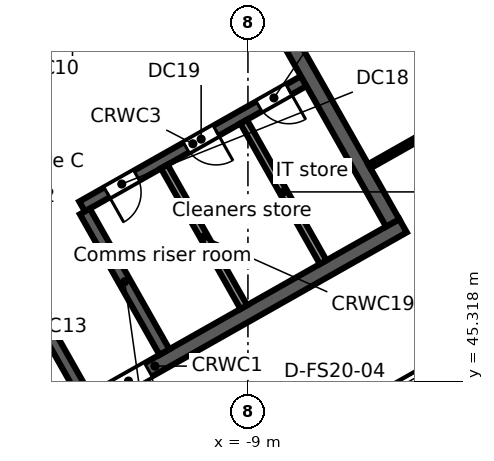
"""IFC4 building model, lengths in metres.
Left out: names, types, materials, properties, quantities, classifications, styles, units other than length and angle.
Written with IfcOpenShell. Run it as: python <this file> out.ifc"""

import sys

from ifc_helpers import new_model, si_unit, direction, frame, frame_2d, origin, place, context, subcontext, project, spatial, rectangle, extrude, element, fill, save


model = new_model("IFC4")
c1 = context("Model", 3, precision=1e-05, world=origin(), true_north=direction((0.0, 1.0)))
c2 = subcontext(c1, "Body", "Model", "MODEL_VIEW")
j1 = project(units=[si_unit("LENGTHUNIT", "METRE"), si_unit("PLANEANGLEUNIT", "RADIAN")], contexts=[c1])
p1 = place(None, origin())
s1 = spatial("IfcSite", under=j1, at=p1, CompositionType="ELEMENT")
p2 = place(p1, origin())
s2 = spatial("IfcBuilding", under=s1, at=p2, CompositionType="ELEMENT")
p3 = place(p2, frame((0.0, 0.0, 293.1)))
s3 = spatial("IfcBuildingStorey", under=s2, at=p3, CompositionType="ELEMENT", Elevation=293.1)
p4 = place(p3, frame((-58.732, 38.771, 0.0), z_axis=(0.0, 0.0, 1.0), x_axis=(0.870355615581, 0.492423702137, 0.0)))
e1 = element("IfcWall", 1, at=p4, inside=s3, PredefinedType="STANDARD", context=c2, shape_type="SweptSolid", body=[
    extrude(rectangle(XDim=64.052, YDim=0.25, at=frame_2d((32.026, 0.0))), origin(), (0.0, 0.0, 1.0), 3.52),
])
p5 = place(p4, frame((61.259, 0.0, 0.8)))
e2 = element("IfcOpeningElement", 2, at=p5, cuts=e1, PredefinedType="OPENING", context=c2, shape_type="SweptSolid", body=[
    extrude(rectangle(XDim=2.4, YDim=2.2, at=frame_2d((1.2, 1.1))), frame((0.0, 0.135, 0.0), z_axis=(0.0, -1.0, 0.0), x_axis=(1.0, 0.0, 0.0)), (0.0, 0.0, 1.0), 0.27),
])
p6 = place(p4, frame((58.216, 0.0, 0.8)))
e3 = element("IfcOpeningElement", 3, at=p6, cuts=e1, PredefinedType="OPENING", context=c2, shape_type="SweptSolid", body=[
    extrude(rectangle(XDim=2.4, YDim=2.2, at=frame_2d((1.2, 1.1))), frame((0.0, 0.135, 0.0), z_axis=(0.0, -1.0, 0.0), x_axis=(1.0, 0.0, 0.0)), (0.0, 0.0, 1.0), 0.27),
])
p7 = place(p4, frame((55.173, 0.0, 0.8)))
e4 = element("IfcOpeningElement", 4, at=p7, cuts=e1, PredefinedType="OPENING", context=c2, shape_type="SweptSolid", body=[
    extrude(rectangle(XDim=2.4, YDim=2.2, at=frame_2d((1.2, 1.1))), frame((0.0, 0.135, 0.0), z_axis=(0.0, -1.0, 0.0), x_axis=(1.0, 0.0, 0.0)), (0.0, 0.0, 1.0), 0.27),
])
p8 = place(p4, frame((52.129, 0.0, 0.8)))
e5 = element("IfcOpeningElement", 5, at=p8, cuts=e1, PredefinedType="OPENING", context=c2, shape_type="SweptSolid", body=[
    extrude(rectangle(XDim=2.4, YDim=2.2, at=frame_2d((1.2, 1.1))), frame((0.0, 0.135, 0.0), z_axis=(0.0, -1.0, 0.0), x_axis=(1.0, 0.0, 0.0)), (0.0, 0.0, 1.0), 0.27),
])
p9 = place(p4, frame((49.086, 0.0, 0.8)))
e6 = element("IfcOpeningElement", 6, at=p9, cuts=e1, PredefinedType="OPENING", context=c2, shape_type="SweptSolid", body=[
    extrude(rectangle(XDim=2.4, YDim=2.2, at=frame_2d((1.2, 1.1))), frame((0.0, 0.135, 0.0), z_axis=(0.0, -1.0, 0.0), x_axis=(1.0, 0.0, 0.0)), (0.0, 0.0, 1.0), 0.27),
])
p10 = place(p4, frame((46.043, 0.0, 0.8)))
e7 = element("IfcOpeningElement", 7, at=p10, cuts=e1, PredefinedType="OPENING", context=c2, shape_type="SweptSolid", body=[
    extrude(rectangle(XDim=2.4, YDim=2.2, at=frame_2d((1.2, 1.1))), frame((0.0, 0.135, 0.0), z_axis=(0.0, -1.0, 0.0), x_axis=(1.0, 0.0, 0.0)), (0.0, 0.0, 1.0), 0.27),
])
p11 = place(p4, frame((43.0, 0.0, 0.8)))
e8 = element("IfcOpeningElement", 8, at=p11, cuts=e1, PredefinedType="OPENING", context=c2, shape_type="SweptSolid", body=[
    extrude(rectangle(XDim=2.4, YDim=2.2, at=frame_2d((1.2, 1.1))), frame((0.0, 0.135, 0.0), z_axis=(0.0, -1.0, 0.0), x_axis=(1.0, 0.0, 0.0)), (0.0, 0.0, 1.0), 0.27),
])
p12 = place(p4, frame((39.956, 0.0, 0.8)))
e9 = element("IfcOpeningElement", 9, at=p12, cuts=e1, PredefinedType="OPENING", context=c2, shape_type="SweptSolid", body=[
    extrude(rectangle(XDim=2.4, YDim=2.2, at=frame_2d((1.2, 1.1))), frame((0.0, 0.135, 0.0), z_axis=(0.0, -1.0, 0.0), x_axis=(1.0, 0.0, 0.0)), (0.0, 0.0, 1.0), 0.27),
])
p13 = place(p4, frame((36.913, 0.0, 0.8)))
e10 = element("IfcOpeningElement", 10, at=p13, cuts=e1, PredefinedType="OPENING", context=c2, shape_type="SweptSolid", body=[
    extrude(rectangle(XDim=2.4, YDim=2.2, at=frame_2d((1.2, 1.1))), frame((0.0, 0.135, 0.0), z_axis=(0.0, -1.0, 0.0), x_axis=(1.0, 0.0, 0.0)), (0.0, 0.0, 1.0), 0.27),
])
p14 = place(p4, frame((33.87, 0.0, 0.8)))
e11 = element("IfcOpeningElement", 11, at=p14, cuts=e1, PredefinedType="OPENING", context=c2, shape_type="SweptSolid", body=[
    extrude(rectangle(XDim=2.4, YDim=2.2, at=frame_2d((1.2, 1.1))), frame((0.0, 0.135, 0.0), z_axis=(0.0, -1.0, 0.0), x_axis=(1.0, 0.0, 0.0)), (0.0, 0.0, 1.0), 0.27),
])
p15 = place(p4, frame((30.826, 0.0, 0.8)))
e12 = element("IfcOpeningElement", 12, at=p15, cuts=e1, PredefinedType="OPENING", context=c2, shape_type="SweptSolid", body=[
    extrude(rectangle(XDim=2.4, YDim=2.2, at=frame_2d((1.2, 1.1))), frame((0.0, 0.135, 0.0), z_axis=(0.0, -1.0, 0.0), x_axis=(1.0, 0.0, 0.0)), (0.0, 0.0, 1.0), 0.27),
])
p16 = place(p4, frame((27.783, 0.0, 0.8)))
e13 = element("IfcOpeningElement", 13, at=p16, cuts=e1, PredefinedType="OPENING", context=c2, shape_type="SweptSolid", body=[
    extrude(rectangle(XDim=2.4, YDim=2.2, at=frame_2d((1.2, 1.1))), frame((0.0, 0.135, 0.0), z_axis=(0.0, -1.0, 0.0), x_axis=(1.0, 0.0, 0.0)), (0.0, 0.0, 1.0), 0.27),
])
p17 = place(p4, frame((24.74, 0.0, 0.8)))
e14 = element("IfcOpeningElement", 14, at=p17, cuts=e1, PredefinedType="OPENING", context=c2, shape_type="SweptSolid", body=[
    extrude(rectangle(XDim=2.4, YDim=2.2, at=frame_2d((1.2, 1.1))), frame((0.0, 0.135, 0.0), z_axis=(0.0, -1.0, 0.0), x_axis=(1.0, 0.0, 0.0)), (0.0, 0.0, 1.0), 0.27),
])
p18 = place(p4, frame((21.696, 0.0, 0.8)))
e15 = element("IfcOpeningElement", 15, at=p18, cuts=e1, PredefinedType="OPENING", context=c2, shape_type="SweptSolid", body=[
    extrude(rectangle(XDim=2.4, YDim=2.2, at=frame_2d((1.2, 1.1))), frame((0.0, 0.135, 0.0), z_axis=(0.0, -1.0, 0.0), x_axis=(1.0, 0.0, 0.0)), (0.0, 0.0, 1.0), 0.27),
])
p19 = place(p4, frame((18.653, 0.0, 0.8)))
e16 = element("IfcOpeningElement", 16, at=p19, cuts=e1, PredefinedType="OPENING", context=c2, shape_type="SweptSolid", body=[
    extrude(rectangle(XDim=2.4, YDim=2.2, at=frame_2d((1.2, 1.1))), frame((0.0, 0.135, 0.0), z_axis=(0.0, -1.0, 0.0), x_axis=(1.0, 0.0, 0.0)), (0.0, 0.0, 1.0), 0.27),
])
p20 = place(p4, frame((15.61, 0.0, 0.8)))
e17 = element("IfcOpeningElement", 17, at=p20, cuts=e1, PredefinedType="OPENING", context=c2, shape_type="SweptSolid", body=[
    extrude(rectangle(XDim=2.4, YDim=2.2, at=frame_2d((1.2, 1.1))), frame((0.0, 0.135, 0.0), z_axis=(0.0, -1.0, 0.0), x_axis=(1.0, 0.0, 0.0)), (0.0, 0.0, 1.0), 0.27),
])
p21 = place(p4, frame((12.567, 0.0, 0.8)))
e18 = element("IfcOpeningElement", 18, at=p21, cuts=e1, PredefinedType="OPENING", context=c2, shape_type="SweptSolid", body=[
    extrude(rectangle(XDim=2.4, YDim=2.2, at=frame_2d((1.2, 1.1))), frame((0.0, 0.135, 0.0), z_axis=(0.0, -1.0, 0.0), x_axis=(1.0, 0.0, 0.0)), (0.0, 0.0, 1.0), 0.27),
])
p22 = place(p4, frame((9.523, 0.0, 0.8)))
e19 = element("IfcOpeningElement", 19, at=p22, cuts=e1, PredefinedType="OPENING", context=c2, shape_type="SweptSolid", body=[
    extrude(rectangle(XDim=2.4, YDim=2.2, at=frame_2d((1.2, 1.1))), frame((0.0, 0.135, 0.0), z_axis=(0.0, -1.0, 0.0), x_axis=(1.0, 0.0, 0.0)), (0.0, 0.0, 1.0), 0.27),
])
p23 = place(p4, frame((6.48, 0.0, 0.8)))
e20 = element("IfcOpeningElement", 20, at=p23, cuts=e1, PredefinedType="OPENING", context=c2, shape_type="SweptSolid", body=[
    extrude(rectangle(XDim=2.4, YDim=2.2, at=frame_2d((1.2, 1.1))), frame((0.0, 0.135, 0.0), z_axis=(0.0, -1.0, 0.0), x_axis=(1.0, 0.0, 0.0)), (0.0, 0.0, 1.0), 0.27),
])
p24 = place(p4, frame((3.437, 0.0, 0.8)))
e21 = element("IfcOpeningElement", 21, at=p24, cuts=e1, PredefinedType="OPENING", context=c2, shape_type="SweptSolid", body=[
    extrude(rectangle(XDim=2.4, YDim=2.2, at=frame_2d((1.2, 1.1))), frame((0.0, 0.135, 0.0), z_axis=(0.0, -1.0, 0.0), x_axis=(1.0, 0.0, 0.0)), (0.0, 0.0, 1.0), 0.27),
])
p25 = place(p4, frame((0.393, 0.0, 0.8)))
e22 = element("IfcOpeningElement", 22, at=p25, cuts=e1, PredefinedType="OPENING", context=c2, shape_type="SweptSolid", body=[
    extrude(rectangle(XDim=2.4, YDim=2.2, at=frame_2d((1.2, 1.1))), frame((0.0, 0.135, 0.0), z_axis=(0.0, -1.0, 0.0), x_axis=(1.0, 0.0, 0.0)), (0.0, 0.0, 1.0), 0.27),
])
p26 = place(p3, frame((-3.017, 46.293, 0.0), z_axis=(0.0, 0.0, 1.0), x_axis=(-0.870355474887, -0.492423950812, 0.0)))
e23 = element("IfcWall", 23, at=p26, inside=s3, PredefinedType="STANDARD", context=c2, shape_type="SweptSolid", body=[
    extrude(rectangle(XDim=40.34, YDim=0.25, at=frame_2d((20.17, 0.0))), origin(), (0.0, 0.0, 1.0), 3.52),
])
p27 = place(p26, frame((37.428, 0.0, 0.8)))
e24 = element("IfcOpeningElement", 24, at=p27, cuts=e23, PredefinedType="OPENING", context=c2, shape_type="SweptSolid", body=[
    extrude(rectangle(XDim=2.4, YDim=2.2, at=frame_2d((1.2, 1.1))), frame((0.0, 0.135, 0.0), z_axis=(0.0, -1.0, 0.0), x_axis=(1.0, 0.0, 0.0)), (0.0, 0.0, 1.0), 0.27),
])
p28 = place(p26, frame((34.372, 0.0, 0.0)))
e25 = element("IfcOpeningElement", 25, at=p28, cuts=e23, PredefinedType="OPENING", context=c2, shape_type="SweptSolid", body=[
    extrude(rectangle(XDim=1.8, YDim=2.4, at=frame_2d((0.9, 1.2))), frame((0.0, 0.135, 0.0), z_axis=(0.0, -1.0, 0.0), x_axis=(1.0, 0.0, 0.0)), (0.0, 0.0, 1.0), 0.27),
])
p29 = place(p26, frame((30.716, 0.0, 0.8)))
e26 = element("IfcOpeningElement", 26, at=p29, cuts=e23, PredefinedType="OPENING", context=c2, shape_type="SweptSolid", body=[
    extrude(rectangle(XDim=2.4, YDim=2.2, at=frame_2d((1.2, 1.1))), frame((0.0, 0.135, 0.0), z_axis=(0.0, -1.0, 0.0), x_axis=(1.0, 0.0, 0.0)), (0.0, 0.0, 1.0), 0.27),
])
p30 = place(p26, frame((27.36, 0.0, 0.8)))
e27 = element("IfcOpeningElement", 27, at=p30, cuts=e23, PredefinedType="OPENING", context=c2, shape_type="SweptSolid", body=[
    extrude(rectangle(XDim=2.4, YDim=2.2, at=frame_2d((1.2, 1.1))), frame((0.0, 0.135, 0.0), z_axis=(0.0, -1.0, 0.0), x_axis=(1.0, 0.0, 0.0)), (0.0, 0.0, 1.0), 0.27),
])
p31 = place(p26, frame((24.304, 0.0, 0.0)))
e28 = element("IfcOpeningElement", 28, at=p31, cuts=e23, PredefinedType="OPENING", context=c2, shape_type="SweptSolid", body=[
    extrude(rectangle(XDim=1.8, YDim=2.4, at=frame_2d((0.9, 1.2))), frame((0.0, 0.135, 0.0), z_axis=(0.0, -1.0, 0.0), x_axis=(1.0, 0.0, 0.0)), (0.0, 0.0, 1.0), 0.27),
])
p32 = place(p26, frame((20.648, 0.0, 0.8)))
e29 = element("IfcOpeningElement", 29, at=p32, cuts=e23, PredefinedType="OPENING", context=c2, shape_type="SweptSolid", body=[
    extrude(rectangle(XDim=2.4, YDim=2.2, at=frame_2d((1.2, 1.1))), frame((0.0, 0.135, 0.0), z_axis=(0.0, -1.0, 0.0), x_axis=(1.0, 0.0, 0.0)), (0.0, 0.0, 1.0), 0.27),
])
p33 = place(p26, frame((17.292, 0.0, 0.8)))
e30 = element("IfcOpeningElement", 30, at=p33, cuts=e23, PredefinedType="OPENING", context=c2, shape_type="SweptSolid", body=[
    extrude(rectangle(XDim=2.4, YDim=2.2, at=frame_2d((1.2, 1.1))), frame((0.0, 0.135, 0.0), z_axis=(0.0, -1.0, 0.0), x_axis=(1.0, 0.0, 0.0)), (0.0, 0.0, 1.0), 0.27),
])
p34 = place(p26, frame((14.236, 0.0, 0.0)))
e31 = element("IfcOpeningElement", 31, at=p34, cuts=e23, PredefinedType="OPENING", context=c2, shape_type="SweptSolid", body=[
    extrude(rectangle(XDim=1.8, YDim=2.4, at=frame_2d((0.9, 1.2))), frame((0.0, 0.135, 0.0), z_axis=(0.0, -1.0, 0.0), x_axis=(1.0, 0.0, 0.0)), (0.0, 0.0, 1.0), 0.27),
])
p35 = place(p26, frame((10.58, 0.0, 0.8)))
e32 = element("IfcOpeningElement", 32, at=p35, cuts=e23, PredefinedType="OPENING", context=c2, shape_type="SweptSolid", body=[
    extrude(rectangle(XDim=2.4, YDim=2.2, at=frame_2d((1.2, 1.1))), frame((0.0, 0.135, 0.0), z_axis=(0.0, -1.0, 0.0), x_axis=(1.0, 0.0, 0.0)), (0.0, 0.0, 1.0), 0.27),
])
p36 = place(p26, frame((7.224, 0.0, 0.8)))
e33 = element("IfcOpeningElement", 33, at=p36, cuts=e23, PredefinedType="OPENING", context=c2, shape_type="SweptSolid", body=[
    extrude(rectangle(XDim=2.4, YDim=2.2, at=frame_2d((1.2, 1.1))), frame((0.0, 0.135, 0.0), z_axis=(0.0, -1.0, 0.0), x_axis=(1.0, 0.0, 0.0)), (0.0, 0.0, 1.0), 0.27),
])
p37 = place(p26, frame((4.168, 0.0, 0.0)))
e34 = element("IfcOpeningElement", 34, at=p37, cuts=e23, PredefinedType="OPENING", context=c2, shape_type="SweptSolid", body=[
    extrude(rectangle(XDim=1.8, YDim=2.4, at=frame_2d((0.9, 1.2))), frame((0.0, 0.135, 0.0), z_axis=(0.0, -1.0, 0.0), x_axis=(1.0, 0.0, 0.0)), (0.0, 0.0, 1.0), 0.27),
])
p38 = place(p26, frame((0.512, 0.0, 0.8)))
e35 = element("IfcOpeningElement", 35, at=p38, cuts=e23, PredefinedType="OPENING", context=c2, shape_type="SweptSolid", body=[
    extrude(rectangle(XDim=2.4, YDim=2.2, at=frame_2d((1.2, 1.1))), frame((0.0, 0.135, 0.0), z_axis=(0.0, -1.0, 0.0), x_axis=(1.0, 0.0, 0.0)), (0.0, 0.0, 1.0), 0.27),
])
p39 = place(p3, frame((-17.975, 42.017, 0.0), z_axis=(0.0, 0.0, 1.0), x_axis=(0.87034965173, 0.492434243055, 0.0)))
e36 = element("IfcWall", 36, at=p39, inside=s3, PredefinedType="SOLIDWALL", context=c2, shape_type="SweptSolid", body=[
    extrude(rectangle(XDim=15.0, YDim=0.4, at=frame_2d((7.5, 0.0))), origin(), (0.0, 0.0, 1.0), 3.52),
])
p40 = place(p39, frame((6.1, 0.0, 0.0)))
e37 = element("IfcOpeningElement", 37, at=p40, cuts=e36, PredefinedType="OPENING", context=c2, shape_type="SweptSolid", body=[
    extrude(rectangle(XDim=1.2, YDim=2.1, at=frame_2d((0.6, 1.05))), frame((0.0, 0.21, 0.0), z_axis=(0.0, -1.0, 0.0), x_axis=(1.0, 0.0, 0.0)), (0.0, 0.0, 1.0), 0.42),
])
p41 = place(p3, frame((-13.365, 49.911, 0.0), z_axis=(0.0, 0.0, 1.0), x_axis=(0.870347618718, 0.492437836272, 0.0)))
e38 = element("IfcWall", 38, at=p41, inside=s3, PredefinedType="SOLIDWALL", context=c2, shape_type="SweptSolid", body=[
    extrude(rectangle(XDim=6.7, YDim=0.3, at=frame_2d((3.35, 0.0))), origin(), (0.0, 0.0, 1.0), 3.52),
])
p42 = place(p41, frame((0.75, 0.0, 0.0)))
e39 = element("IfcOpeningElement", 39, at=p42, cuts=e38, PredefinedType="OPENING", context=c2, shape_type="SweptSolid", body=[
    extrude(rectangle(XDim=0.9, YDim=2.1, at=frame_2d((0.45, 1.05))), frame((0.0, 0.16, 0.0), z_axis=(0.0, -1.0, 0.0), x_axis=(1.0, 0.0, 0.0)), (0.0, 0.0, 1.0), 0.32),
])
p43 = place(p41, frame((3.15, 0.0, 0.0)))
e40 = element("IfcOpeningElement", 40, at=p43, cuts=e38, PredefinedType="OPENING", context=c2, shape_type="SweptSolid", body=[
    extrude(rectangle(XDim=0.9, YDim=2.1, at=frame_2d((0.45, 1.05))), frame((0.0, 0.16, 0.0), z_axis=(0.0, -1.0, 0.0), x_axis=(1.0, 0.0, 0.0)), (0.0, 0.0, 1.0), 0.32),
])
p44 = place(p41, frame((5.35, 0.0, 0.0)))
e41 = element("IfcOpeningElement", 41, at=p44, cuts=e38, PredefinedType="OPENING", context=c2, shape_type="SweptSolid", body=[
    extrude(rectangle(XDim=0.9, YDim=2.1, at=frame_2d((0.45, 1.05))), frame((0.0, 0.16, 0.0), z_axis=(0.0, -1.0, 0.0), x_axis=(1.0, 0.0, 0.0)), (0.0, 0.0, 1.0), 0.32),
])
p45 = place(p3, frame((-15.618, 53.691, 0.0), z_axis=(0.0, 0.0, 1.0), x_axis=(0.870362830851, 0.492410948978, 0.0)))
e42 = element("IfcWall", 42, at=p45, inside=s3, PredefinedType="SOLIDWALL", context=c2, shape_type="SweptSolid", body=[
    extrude(rectangle(XDim=6.8, YDim=0.3, at=frame_2d((3.4, 0.0))), origin(), (0.0, 0.0, 1.0), 3.52),
])
p46 = place(p45, frame((1.85, 0.0, 0.0)))
e43 = element("IfcOpeningElement", 43, at=p46, cuts=e42, PredefinedType="OPENING", context=c2, shape_type="SweptSolid", body=[
    extrude(rectangle(XDim=0.9, YDim=2.1, at=frame_2d((0.45, 1.05))), frame((0.0, 0.16, 0.0), z_axis=(0.0, -1.0, 0.0), x_axis=(1.0, 0.0, 0.0)), (0.0, 0.0, 1.0), 0.32),
])
p47 = place(p45, frame((5.3, 0.0, 0.0)))
e44 = element("IfcOpeningElement", 44, at=p47, cuts=e42, PredefinedType="OPENING", context=c2, shape_type="SweptSolid", body=[
    extrude(rectangle(XDim=0.9, YDim=2.1, at=frame_2d((0.45, 1.05))), frame((0.0, 0.16, 0.0), z_axis=(0.0, -1.0, 0.0), x_axis=(1.0, 0.0, 0.0)), (0.0, 0.0, 1.0), 0.32),
])
p48 = place(p3, frame((-24.672, 53.854, 0.0), z_axis=(0.0, 0.0, 1.0), x_axis=(0.870353598469, 0.492427267353, 0.0)))
e45 = element("IfcWall", 45, at=p48, inside=s3, PredefinedType="SOLIDWALL", context=c2, shape_type="SweptSolid", body=[
    extrude(rectangle(XDim=15.0, YDim=0.4, at=frame_2d((7.5, 0.0))), origin(), (0.0, 0.0, 1.0), 3.52),
])
p49 = place(p3, frame((-15.379, 48.599, 0.0), z_axis=(0.0, 0.0, 1.0), x_axis=(0.492422543467, -0.870356271124, 0.0)))
e46 = element("IfcWall", 46, at=p49, inside=s3, PredefinedType="SOLIDWALL", context=c2, shape_type="SweptSolid", body=[
    extrude(rectangle(XDim=4.25, YDim=0.3, at=frame_2d((2.125, 0.0))), origin(), (0.0, 0.0, 1.0), 3.52),
])
p50 = place(p3, frame((-13.291, 49.781, 0.0), z_axis=(0.0, 0.0, 1.0), x_axis=(0.492397924348, -0.870370199454, 0.0)))
e47 = element("IfcWall", 47, at=p50, inside=s3, PredefinedType="SOLIDWALL", context=c2, shape_type="SweptSolid", body=[
    extrude(rectangle(XDim=4.25, YDim=0.3, at=frame_2d((2.125, 0.0))), origin(), (0.0, 0.0, 1.0), 3.52),
])
p51 = place(p3, frame((-11.202, 50.962, 0.0), z_axis=(0.0, 0.0, 1.0), x_axis=(0.492441437811, -0.870345580977, 0.0)))
e48 = element("IfcWall", 48, at=p51, inside=s3, PredefinedType="PARTITIONING", context=c2, shape_type="SweptSolid", body=[
    extrude(rectangle(XDim=4.25, YDim=0.2, at=frame_2d((2.125, 0.0))), origin(), (0.0, 0.0, 1.0), 3.52),
])
p52 = place(p3, frame((-9.113, 52.144, 0.0), z_axis=(0.0, 0.0, 1.0), x_axis=(0.492422543467, -0.870356271124, 0.0)))
e49 = element("IfcWall", 49, at=p52, inside=s3, PredefinedType="PARTITIONING", context=c2, shape_type="SweptSolid", body=[
    extrude(rectangle(XDim=4.25, YDim=0.2, at=frame_2d((2.125, 0.0))), origin(), (0.0, 0.0, 1.0), 3.52),
])
p53 = place(p3, frame((-11.692, 60.968, 0.0), z_axis=(0.0, 0.0, 1.0), x_axis=(0.492421663121, -0.870356769198, 0.0)))
e50 = element("IfcWall", 50, at=p53, inside=s3, PredefinedType="SOLIDWALL", context=c2, shape_type="SweptSolid", body=[
    extrude(rectangle(XDim=13.2, YDim=0.4, at=frame_2d((6.6, 0.0))), origin(), (0.0, 0.0, 1.0), 3.52),
])
p54 = place(p3, frame((-5.806, 50.97, 0.0), z_axis=(0.0, 0.0, 1.0), x_axis=(0.870355163327, 0.492424501492, 0.0)))
e51 = element("IfcWall", 51, at=p54, inside=s3, PredefinedType="PARTITIONING", context=c2, shape_type="SweptSolid", body=[
    extrude(rectangle(XDim=6.527, YDim=0.125, at=frame_2d((3.264, 0.0))), origin(), (0.0, 0.0, 1.0), 2.8),
])
p55 = place(p54, frame((2.7, 0.0, 0.0)))
e52 = element("IfcOpeningElement", 52, at=p55, cuts=e51, PredefinedType="OPENING", context=c2, shape_type="SweptSolid", body=[
    extrude(rectangle(XDim=0.9, YDim=2.1, at=frame_2d((0.45, 1.05))), frame((0.0, 0.073, 0.0), z_axis=(0.0, -1.0, 0.0), x_axis=(1.0, 0.0, 0.0)), (0.0, 0.0, 1.0), 0.145),
])
p56 = place(p38, origin())
e53 = element("IfcWindow", 53, at=p56, inside=s3, PartitioningType="SINGLE_PANEL", PredefinedType="WINDOW", context=c2, shape_type="SweptSolid", body=[
    extrude(rectangle(XDim=2.4, YDim=2.2, at=frame_2d((1.2, 1.1))), frame((0.0, 0.03, 0.0), z_axis=(0.0, -1.0, 0.0), x_axis=(1.0, 0.0, 0.0)), (0.0, 0.0, 1.0), 0.06),
])
fill(e35, e53)
p57 = place(p40, frame((1.2, 0.0, 0.0), z_axis=(0.0, 0.0, 1.0), x_axis=(-1.0, 0.0, 0.0)))
e54 = element("IfcDoor", 54, at=p57, inside=s3, OperationType="SINGLE_SWING_RIGHT", PredefinedType="DOOR", context=c2, shape_type="SweptSolid", body=[
    extrude(rectangle(XDim=1.2, YDim=2.1, at=frame_2d((0.6, 1.05))), frame((0.0, 0.025, 0.0), z_axis=(0.0, -1.0, 0.0), x_axis=(1.0, 0.0, 0.0)), (0.0, 0.0, 1.0), 0.05),
])
fill(e37, e54)
p58 = place(p42, frame((0.9, 0.0, 0.0), z_axis=(0.0, 0.0, 1.0), x_axis=(-1.0, 0.0, 0.0)))
e55 = element("IfcDoor", 55, at=p58, inside=s3, OperationType="SINGLE_SWING_RIGHT", PredefinedType="DOOR", context=c2, shape_type="SweptSolid", body=[
    extrude(rectangle(XDim=0.9, YDim=2.1, at=frame_2d((0.45, 1.05))), frame((0.0, 0.025, 0.0), z_axis=(0.0, -1.0, 0.0), x_axis=(1.0, 0.0, 0.0)), (0.0, 0.0, 1.0), 0.05),
])
fill(e39, e55)
p59 = place(p43, frame((0.9, 0.0, 0.0), z_axis=(0.0, 0.0, 1.0), x_axis=(-1.0, 0.0, 0.0)))
e56 = element("IfcDoor", 56, at=p59, inside=s3, OperationType="SINGLE_SWING_LEFT", PredefinedType="DOOR", context=c2, shape_type="SweptSolid", body=[
    extrude(rectangle(XDim=0.9, YDim=2.1, at=frame_2d((0.45, 1.05))), frame((0.0, 0.025, 0.0), z_axis=(0.0, -1.0, 0.0), x_axis=(1.0, 0.0, 0.0)), (0.0, 0.0, 1.0), 0.05),
])
fill(e40, e56)
p60 = place(p44, frame((0.9, 0.0, 0.0), z_axis=(0.0, 0.0, 1.0), x_axis=(-1.0, 0.0, 0.0)))
e57 = element("IfcDoor", 57, at=p60, inside=s3, OperationType="SINGLE_SWING_LEFT", PredefinedType="DOOR", context=c2, shape_type="SweptSolid", body=[
    extrude(rectangle(XDim=0.9, YDim=2.1, at=frame_2d((0.45, 1.05))), frame((0.0, 0.025, 0.0), z_axis=(0.0, -1.0, 0.0), x_axis=(1.0, 0.0, 0.0)), (0.0, 0.0, 1.0), 0.05),
])
fill(e41, e57)
save(model, sys.argv[1])
